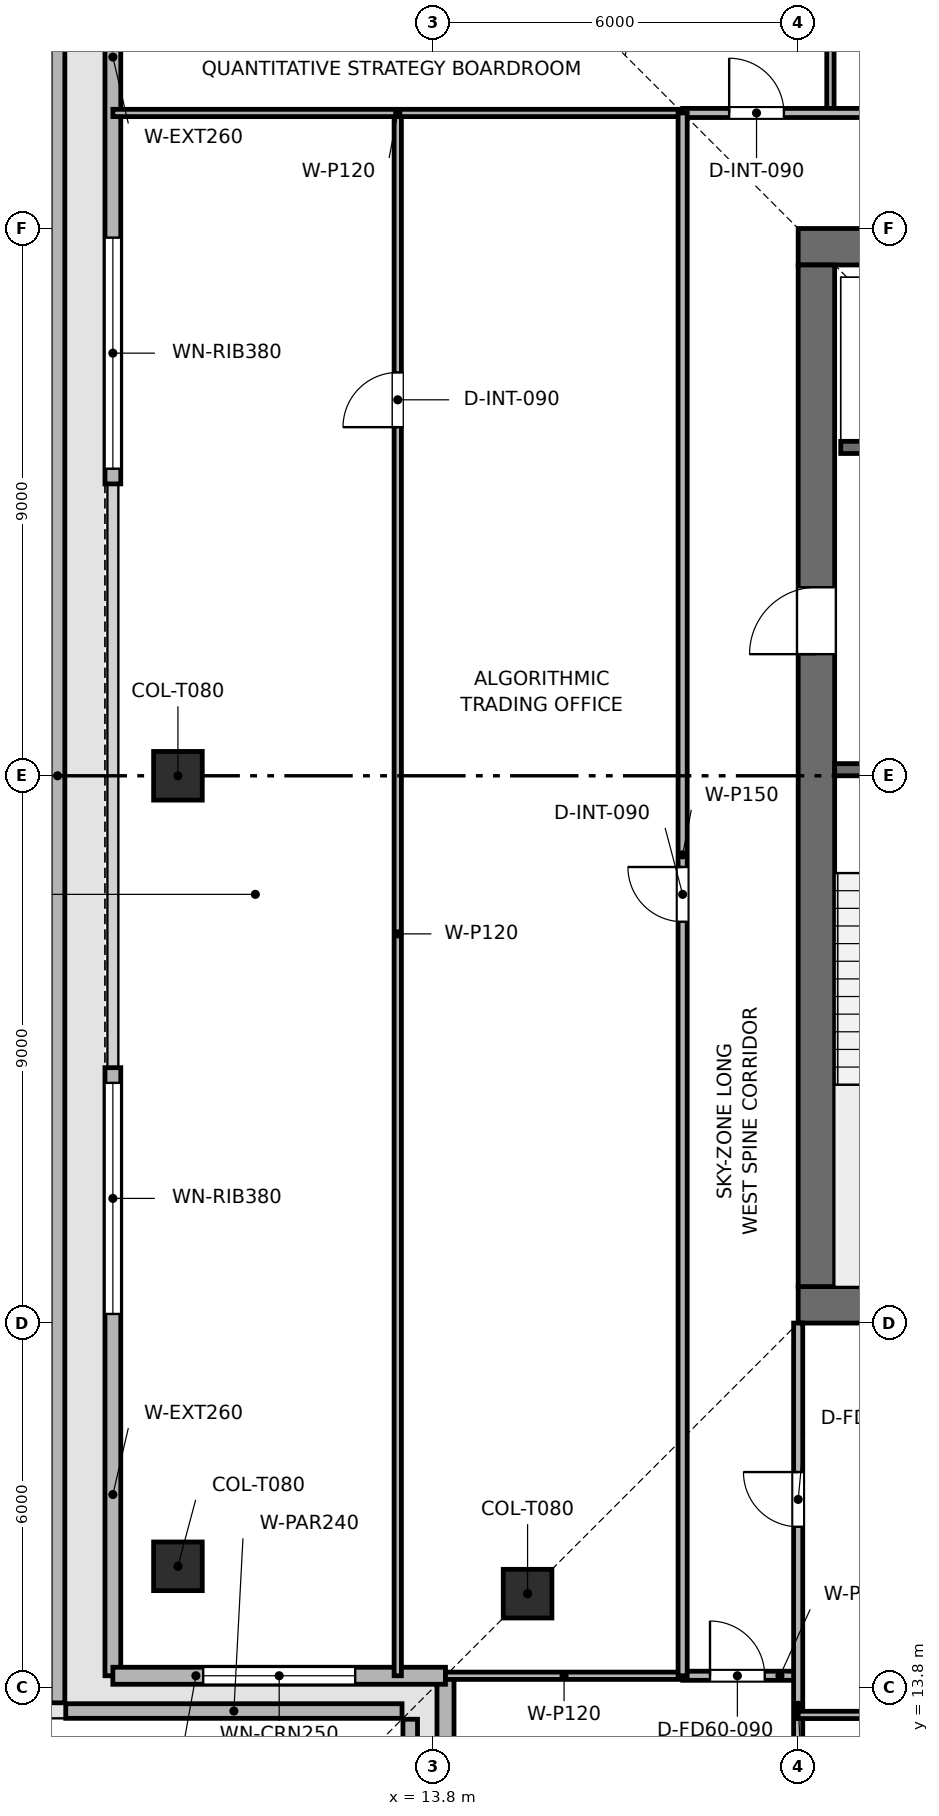
"""IFC4 building model, lengths in metres.
Left out: names, types, materials, properties, quantities, classifications, styles, units other than length and angle.
Written with IfcOpenShell. Run it as: python <this file> out.ifc"""

import sys

from ifc_helpers import new_model, si_unit, direction, frame, frame_2d, origin, origin_2d, place, context, subcontext, project, spatial, rectangle, extrude, element, fill, save


model = new_model("IFC4")
c1 = context("Model", 3, precision=1e-05, world=origin(), true_north=direction((0.0, 1.0)))
c2 = subcontext(c1, "Body", "Model", "MODEL_VIEW")
j1 = project(units=[si_unit("LENGTHUNIT", "METRE"), si_unit("PLANEANGLEUNIT", "RADIAN")], contexts=[c1])
p1 = place(None, origin())
s1 = spatial("IfcSite", under=j1, at=p1, CompositionType="ELEMENT")
p2 = place(p1, origin())
s2 = spatial("IfcBuilding", under=s1, at=p2, CompositionType="ELEMENT")
p3 = place(p2, frame((0.0, 0.0, 355.5)))
s3 = spatial("IfcBuildingStorey", under=s2, at=p3, CompositionType="ELEMENT", Elevation=355.5)
p4 = place(p3, frame((19.8, 20.1, 0.0), z_axis=(0.0, 0.0, 1.0), x_axis=(1.0, 0.0, 0.0)))
e1 = element("IfcWall", 1, at=p4, inside=s3, PredefinedType="SHEAR", context=c2, shape_type="SweptSolid", body=[
    extrude(rectangle(XDim=18.0, YDim=0.6, at=frame_2d((9.0, 0.0))), origin(), (0.0, 0.0, 1.0), 4.5),
])
p5 = place(p3, frame((19.8, 37.5, 0.0), z_axis=(0.0, 0.0, 1.0), x_axis=(1.0, 0.0, 0.0)))
e2 = element("IfcWall", 2, at=p5, inside=s3, PredefinedType="SHEAR", context=c2, shape_type="SweptSolid", body=[
    extrude(rectangle(XDim=18.0, YDim=0.6, at=frame_2d((9.0, 0.0))), origin(), (0.0, 0.0, 1.0), 4.5),
])
p6 = place(p5, frame((7.05, 0.0, 0.0)))
e3 = element("IfcOpeningElement", 3, at=p6, cuts=e2, PredefinedType="OPENING", context=c2, shape_type="SweptSolid", body=[
    extrude(rectangle(XDim=1.1, YDim=2.15, at=frame_2d((0.55, 1.075))), frame((0.0, 0.31, 0.0), z_axis=(0.0, -1.0, 0.0), x_axis=(1.0, 0.0, 0.0)), (0.0, 0.0, 1.0), 0.62),
])
p7 = place(p3, frame((20.1, 20.4, 0.0), z_axis=(0.0, 0.0, 1.0), x_axis=(0.0, 1.0, 0.0)))
e4 = element("IfcWall", 4, at=p7, inside=s3, PredefinedType="SHEAR", context=c2, shape_type="SweptSolid", body=[
    extrude(rectangle(XDim=16.8, YDim=0.6, at=frame_2d((8.4, 0.0))), origin(), (0.0, 0.0, 1.0), 4.5),
])
p8 = place(p7, frame((10.4, 0.0, 0.0)))
e5 = element("IfcOpeningElement", 5, at=p8, cuts=e4, PredefinedType="OPENING", context=c2, shape_type="SweptSolid", body=[
    extrude(rectangle(XDim=1.1, YDim=2.15, at=frame_2d((0.55, 1.075))), frame((0.0, 0.31, 0.0), z_axis=(0.0, -1.0, 0.0), x_axis=(1.0, 0.0, 0.0)), (0.0, 0.0, 1.0), 0.62),
])
for number, where, z_axis, x_axis in (
    (6, (9.6, 28.8, 0.003), (0.0, 0.0, 1.0), (1.0, 0.0, 0.0)),
    (7, (9.6, 15.8, 0.003), (0.0, 0.0, 1.0), (1.0, 0.0, 0.0)),
    (8, (15.35, 15.35, 0.003), (0.0, 0.0, 1.0), (1.0, 0.0, 0.0)),
):
    element("IfcColumn", number, at=place(p3, frame(where, z_axis=z_axis, x_axis=x_axis)), inside=s3, PredefinedType="COLUMN", context=c2, shape_type="SweptSolid", body=[
        extrude(rectangle(XDim=0.8, YDim=0.8, at=origin_2d()), origin(), (0.0, 0.0, 1.0), 4.234),
    ])
p9 = place(p3, frame((7.62, 44.045, 0.0), z_axis=(0.0, 0.0, 1.0), x_axis=(0.0, -1.0, 0.0)))
e9 = element("IfcWall", 9, at=p9, inside=s3, PredefinedType="PARAPET", context=c2, shape_type="SweptSolid", body=[
    extrude(rectangle(XDim=30.49, YDim=0.24, at=frame_2d((15.245, 0.0))), origin(), (0.0, 0.0, 1.0), 1.2),
])
for number, where, z_axis, x_axis in (
    (10, (7.755, 13.42, 0.0), (0.0, 0.0, 1.0), (1.0, 0.0, 0.0)),
    (11, (13.42, 13.285, 0.0), (0.0, 0.0, 1.0), (0.0, -1.0, 0.0)),
):
    element("IfcWall", number, at=place(p3, frame(where, z_axis=z_axis, x_axis=x_axis)), inside=s3, PredefinedType="PARAPET", context=c2, shape_type="SweptSolid", body=[
        extrude(rectangle(XDim=5.53, YDim=0.24, at=frame_2d((2.765, 0.0))), origin(), (0.0, 0.0, 1.0), 1.2),
    ])
p10 = place(p3, frame((8.53, 14.0, 0.0), z_axis=(0.0, 0.0, 1.0), x_axis=(0.0, 1.0, 0.0)))
e12 = element("IfcWall", 12, at=p10, inside=s3, PredefinedType="SOLIDWALL", context=c2, shape_type="SweptSolid", body=[
    extrude(rectangle(XDim=10.0, YDim=0.26, at=frame_2d((5.0, 0.0))), origin(), (0.0, 0.0, 1.0), 4.24),
])
p11 = place(p10, frame((5.95, 0.0, 0.9)))
e13 = element("IfcOpeningElement", 13, at=p11, cuts=e12, PredefinedType="OPENING", context=c2, shape_type="SweptSolid", body=[
    extrude(rectangle(XDim=3.8, YDim=1.9, at=frame_2d((1.9, 0.95))), frame((0.0, 0.14, 0.0), z_axis=(0.0, -1.0, 0.0), x_axis=(1.0, 0.0, 0.0)), (0.0, 0.0, 1.0), 0.28),
])
p12 = place(p3, frame((8.53, 33.6, 0.0), z_axis=(0.0, 0.0, 1.0), x_axis=(0.0, 1.0, 0.0)))
e14 = element("IfcWall", 14, at=p12, inside=s3, PredefinedType="SOLIDWALL", context=c2, shape_type="SweptSolid", body=[
    extrude(rectangle(XDim=10.0, YDim=0.26, at=frame_2d((5.0, 0.0))), origin(), (0.0, 0.0, 1.0), 4.24),
])
p13 = place(p12, frame((0.25, 0.0, 0.9)))
e15 = element("IfcOpeningElement", 15, at=p13, cuts=e14, PredefinedType="OPENING", context=c2, shape_type="SweptSolid", body=[
    extrude(rectangle(XDim=3.8, YDim=1.9, at=frame_2d((1.9, 0.95))), frame((0.0, 0.14, 0.0), z_axis=(0.0, -1.0, 0.0), x_axis=(1.0, 0.0, 0.0)), (0.0, 0.0, 1.0), 0.28),
])
p14 = place(p3, frame((14.0, 8.53, 0.0), z_axis=(0.0, 0.0, 1.0), x_axis=(0.0, 1.0, 0.0)))
e16 = element("IfcWall", 16, at=p14, inside=s3, PredefinedType="SOLIDWALL", context=c2, shape_type="SweptSolid", body=[
    extrude(rectangle(XDim=5.47, YDim=0.28, at=frame_2d((2.735, 0.0))), origin(), (0.0, 0.0, 1.0), 4.24),
])
p15 = place(p14, frame((1.485, 0.0, 0.9)))
e17 = element("IfcOpeningElement", 17, at=p15, cuts=e16, PredefinedType="OPENING", context=c2, shape_type="SweptSolid", body=[
    extrude(rectangle(XDim=2.5, YDim=1.9, at=frame_2d((1.25, 0.95))), frame((0.0, 0.15, 0.0), z_axis=(0.0, -1.0, 0.0), x_axis=(1.0, 0.0, 0.0)), (0.0, 0.0, 1.0), 0.3),
])
p16 = place(p3, frame((14.0, 14.0, 0.0), z_axis=(0.0, 0.0, 1.0), x_axis=(-1.0, 0.0, 0.0)))
e18 = element("IfcWall", 18, at=p16, inside=s3, PredefinedType="SOLIDWALL", context=c2, shape_type="SweptSolid", body=[
    extrude(rectangle(XDim=5.47, YDim=0.28, at=frame_2d((2.735, 0.0))), origin(), (0.0, 0.0, 1.0), 4.24),
])
p17 = place(p16, frame((1.485, 0.0, 0.9)))
e19 = element("IfcOpeningElement", 19, at=p17, cuts=e18, PredefinedType="OPENING", context=c2, shape_type="SweptSolid", body=[
    extrude(rectangle(XDim=2.5, YDim=1.9, at=frame_2d((1.25, 0.95))), frame((0.0, 0.15, 0.0), z_axis=(0.0, -1.0, 0.0), x_axis=(1.0, 0.0, 0.0)), (0.0, 0.0, 1.0), 0.3),
])
p18 = place(p3, frame((20.4, 28.9, 0.0), z_axis=(0.0, 0.0, 1.0), x_axis=(1.0, 0.0, 0.0)))
e20 = element("IfcWall", 20, at=p18, inside=s3, PredefinedType="SHEAR", context=c2, shape_type="SweptSolid", body=[
    extrude(rectangle(XDim=3.15, YDim=0.2, at=frame_2d((1.575, 0.0))), origin(), (0.0, 0.0, 1.0), 4.24),
])
p19 = place(p18, frame((0.8, 0.0, 0.0)))
e21 = element("IfcOpeningElement", 21, at=p19, cuts=e20, PredefinedType="OPENING", context=c2, shape_type="SweptSolid", body=[
    extrude(rectangle(XDim=1.0, YDim=2.1, at=frame_2d((0.5, 1.05))), frame((0.0, 0.11, 0.0), z_axis=(0.0, -1.0, 0.0), x_axis=(1.0, 0.0, 0.0)), (0.0, 0.0, 1.0), 0.22),
])
p20 = place(p3, frame((20.5, 34.2, 0.0), z_axis=(0.0, 0.0, 1.0), x_axis=(1.0, 0.0, 0.0)))
e22 = element("IfcWall", 22, at=p20, inside=s3, PredefinedType="SHEAR", context=c2, shape_type="SweptSolid", body=[
    extrude(rectangle(XDim=3.05, YDim=0.2, at=frame_2d((1.525, 0.0))), origin(), (0.0, 0.0, 1.0), 4.24),
])
p21 = place(p20, frame((0.75, 0.0, 0.0)))
e23 = element("IfcOpeningElement", 23, at=p21, cuts=e22, PredefinedType="OPENING", context=c2, shape_type="SweptSolid", body=[
    extrude(rectangle(XDim=1.1, YDim=2.15, at=frame_2d((0.55, 1.075))), frame((0.0, 0.11, 0.0), z_axis=(0.0, -1.0, 0.0), x_axis=(1.0, 0.0, 0.0)), (0.0, 0.0, 1.0), 0.22),
])
p22 = place(p3, frame((20.33, 39.7, 0.0), z_axis=(0.0, 0.0, 1.0), x_axis=(0.0, 1.0, 0.0)))
e24 = element("IfcWall", 24, at=p22, inside=s3, PredefinedType="PARTITIONING", context=c2, shape_type="SweptSolid", body=[
    extrude(rectangle(XDim=9.37, YDim=0.12, at=frame_2d((4.685, 0.0))), origin(), (0.0, 0.0, 1.0), 3.825),
])
p23 = place(p3, frame((13.215, 14.0, 0.0), z_axis=(0.0, 0.0, 1.0), x_axis=(0.0, 1.0, 0.0)))
e25 = element("IfcWall", 25, at=p23, inside=s3, PredefinedType="PARTITIONING", context=c2, shape_type="SweptSolid", body=[
    extrude(rectangle(XDim=25.7, YDim=0.12, at=frame_2d((12.85, 0.0))), origin(), (0.0, 0.0, 1.0), 3.825),
])
p24 = place(p23, frame((20.533, 0.0, 0.0)))
e26 = element("IfcOpeningElement", 26, at=p24, cuts=e25, PredefinedType="OPENING", context=c2, shape_type="SweptSolid", body=[
    extrude(rectangle(XDim=0.9, YDim=2.1, at=frame_2d((0.45, 1.05))), frame((0.0, 0.07, 0.0), z_axis=(0.0, -1.0, 0.0), x_axis=(1.0, 0.0, 0.0)), (0.0, 0.0, 1.0), 0.14),
])
p25 = place(p3, frame((14.0, 14.0, 0.0), z_axis=(0.0, 0.0, 1.0), x_axis=(1.0, 0.0, 0.0)))
e27 = element("IfcWall", 27, at=p25, inside=s3, PredefinedType="PARTITIONING", context=c2, shape_type="SweptSolid", body=[
    extrude(rectangle(XDim=3.9, YDim=0.12, at=frame_2d((1.95, 0.0))), origin(), (0.0, 0.0, 1.0), 3.925),
])
p26 = place(p3, frame((17.9, 14.0, 0.0), z_axis=(0.0, 0.0, 1.0), x_axis=(1.0, 0.0, 0.0)))
e28 = element("IfcWall", 28, at=p26, inside=s3, PredefinedType="PARTITIONING", context=c2, shape_type="SweptSolid", body=[
    extrude(rectangle(XDim=1.9, YDim=0.15, at=frame_2d((0.95, 0.0))), origin(), (0.0, 0.0, 1.0), 4.24),
])
p27 = place(p26, frame((0.45, 0.0, 0.0)))
e29 = element("IfcOpeningElement", 29, at=p27, cuts=e28, PredefinedType="OPENING", context=c2, shape_type="SweptSolid", body=[
    extrude(rectangle(XDim=0.9, YDim=2.1, at=frame_2d((0.45, 1.05))), frame((0.0, 0.085, 0.0), z_axis=(0.0, -1.0, 0.0), x_axis=(1.0, 0.0, 0.0)), (0.0, 0.0, 1.0), 0.17),
])
p28 = place(p3, frame((19.8, 8.53, 0.0), z_axis=(0.0, 0.0, 1.0), x_axis=(0.0, 1.0, 0.0)))
e30 = element("IfcWall", 30, at=p28, inside=s3, PredefinedType="PARTITIONING", context=c2, shape_type="SweptSolid", body=[
    extrude(rectangle(XDim=11.27, YDim=0.15, at=frame_2d((5.635, 0.0))), origin(), (0.0, 0.0, 1.0), 3.825),
])
p29 = place(p28, frame((7.92, 0.0, 0.0)))
e31 = element("IfcOpeningElement", 31, at=p29, cuts=e30, PredefinedType="OPENING", context=c2, shape_type="SweptSolid", body=[
    extrude(rectangle(XDim=0.9, YDim=2.1, at=frame_2d((0.45, 1.05))), frame((0.0, 0.085, 0.0), z_axis=(0.0, -1.0, 0.0), x_axis=(1.0, 0.0, 0.0)), (0.0, 0.0, 1.0), 0.17),
])
p30 = place(p3, frame((19.8, 13.356, 0.0), z_axis=(0.0, 0.0, 1.0), x_axis=(1.0, 0.0, 0.0)))
e32 = element("IfcWall", 32, at=p30, inside=s3, PredefinedType="PARTITIONING", context=c2, shape_type="SweptSolid", body=[
    extrude(rectangle(XDim=6.908, YDim=0.12, at=frame_2d((3.454, 0.0))), origin(), (0.0, 0.0, 1.0), 3.825),
])
p31 = place(p30, frame((2.303, 0.0, 0.0)))
e33 = element("IfcOpeningElement", 33, at=p31, cuts=e32, PredefinedType="OPENING", context=c2, shape_type="SweptSolid", body=[
    extrude(rectangle(XDim=0.9, YDim=2.1, at=frame_2d((0.45, 1.05))), frame((0.0, 0.07, 0.0), z_axis=(0.0, -1.0, 0.0), x_axis=(1.0, 0.0, 0.0)), (0.0, 0.0, 1.0), 0.14),
])
p32 = place(p3, frame((8.53, 39.7, 0.0), z_axis=(0.0, 0.0, 1.0), x_axis=(1.0, 0.0, 0.0)))
e34 = element("IfcWall", 34, at=p32, inside=s3, PredefinedType="PARTITIONING", context=c2, shape_type="SweptSolid", body=[
    extrude(rectangle(XDim=9.37, YDim=0.12, at=frame_2d((4.685, 0.0))), origin(), (0.0, 0.0, 1.0), 3.825),
])
p33 = place(p3, frame((17.9, 39.7, 0.0), z_axis=(0.0, 0.0, 1.0), x_axis=(1.0, 0.0, 0.0)))
e35 = element("IfcWall", 35, at=p33, inside=s3, PredefinedType="PARTITIONING", context=c2, shape_type="SweptSolid", body=[
    extrude(rectangle(XDim=21.8, YDim=0.15, at=frame_2d((10.9, 0.0))), origin(), (0.0, 0.0, 1.0), 3.825),
])
p34 = place(p33, frame((0.765, 0.0, 0.0)))
e36 = element("IfcOpeningElement", 36, at=p34, cuts=e35, PredefinedType="OPENING", context=c2, shape_type="SweptSolid", body=[
    extrude(rectangle(XDim=0.9, YDim=2.1, at=frame_2d((0.45, 1.05))), frame((0.0, 0.085, 0.0), z_axis=(0.0, -1.0, 0.0), x_axis=(1.0, 0.0, 0.0)), (0.0, 0.0, 1.0), 0.17),
])
p35 = place(p33, frame((6.195, 0.0, 0.0)))
e37 = element("IfcOpeningElement", 37, at=p35, cuts=e35, PredefinedType="OPENING", context=c2, shape_type="SweptSolid", body=[
    extrude(rectangle(XDim=0.9, YDim=2.1, at=frame_2d((0.45, 1.05))), frame((0.0, 0.085, 0.0), z_axis=(0.0, -1.0, 0.0), x_axis=(1.0, 0.0, 0.0)), (0.0, 0.0, 1.0), 0.17),
])
p36 = place(p33, frame((15.88, 0.0, 0.0)))
e38 = element("IfcOpeningElement", 38, at=p36, cuts=e35, PredefinedType="OPENING", context=c2, shape_type="SweptSolid", body=[
    extrude(rectangle(XDim=0.9, YDim=2.1, at=frame_2d((0.45, 1.05))), frame((0.0, 0.085, 0.0), z_axis=(0.0, -1.0, 0.0), x_axis=(1.0, 0.0, 0.0)), (0.0, 0.0, 1.0), 0.17),
])
p37 = place(p3, frame((17.9, 14.0, 0.0), z_axis=(0.0, 0.0, 1.0), x_axis=(0.0, 1.0, 0.0)))
e39 = element("IfcWall", 39, at=p37, inside=s3, PredefinedType="PARTITIONING", context=c2, shape_type="SweptSolid", body=[
    extrude(rectangle(XDim=25.7, YDim=0.15, at=frame_2d((12.85, 0.0))), origin(), (0.0, 0.0, 1.0), 3.825),
])
p38 = place(p37, frame((12.4, 0.0, 0.0)))
e40 = element("IfcOpeningElement", 40, at=p38, cuts=e39, PredefinedType="OPENING", context=c2, shape_type="SweptSolid", body=[
    extrude(rectangle(XDim=0.9, YDim=2.1, at=frame_2d((0.45, 1.05))), frame((0.0, 0.085, 0.0), z_axis=(0.0, -1.0, 0.0), x_axis=(1.0, 0.0, 0.0)), (0.0, 0.0, 1.0), 0.17),
])
p39 = place(p11, origin())
e41 = element("IfcWindow", 41, at=p39, inside=s3, PartitioningType="SINGLE_PANEL", PredefinedType="WINDOW", context=c2, shape_type="SweptSolid", body=[
    extrude(rectangle(XDim=3.8, YDim=1.9, at=frame_2d((1.9, 0.95))), frame((0.0, 0.03, 0.0), z_axis=(0.0, -1.0, 0.0), x_axis=(1.0, 0.0, 0.0)), (0.0, 0.0, 1.0), 0.06),
])
fill(e13, e41)
p40 = place(p13, origin())
e42 = element("IfcWindow", 42, at=p40, inside=s3, PartitioningType="SINGLE_PANEL", PredefinedType="WINDOW", context=c2, shape_type="SweptSolid", body=[
    extrude(rectangle(XDim=3.8, YDim=1.9, at=frame_2d((1.9, 0.95))), frame((0.0, 0.03, 0.0), z_axis=(0.0, -1.0, 0.0), x_axis=(1.0, 0.0, 0.0)), (0.0, 0.0, 1.0), 0.06),
])
fill(e15, e42)
p41 = place(p17, origin())
e43 = element("IfcWindow", 43, at=p41, inside=s3, PartitioningType="SINGLE_PANEL", PredefinedType="WINDOW", context=c2, shape_type="SweptSolid", body=[
    extrude(rectangle(XDim=2.5, YDim=1.9, at=frame_2d((1.25, 0.95))), frame((0.0, 0.03, 0.0), z_axis=(0.0, -1.0, 0.0), x_axis=(1.0, 0.0, 0.0)), (0.0, 0.0, 1.0), 0.06),
])
fill(e19, e43)
p42 = place(p24, origin())
e44 = element("IfcDoor", 44, at=p42, inside=s3, OperationType="SINGLE_SWING_LEFT", PredefinedType="DOOR", context=c2, shape_type="SweptSolid", body=[
    extrude(rectangle(XDim=0.9, YDim=2.1, at=frame_2d((0.45, 1.05))), frame((0.0, 0.025, 0.0), z_axis=(0.0, -1.0, 0.0), x_axis=(1.0, 0.0, 0.0)), (0.0, 0.0, 1.0), 0.05),
])
fill(e26, e44)
p43 = place(p27, origin())
e45 = element("IfcDoor", 45, at=p43, inside=s3, OperationType="SINGLE_SWING_LEFT", PredefinedType="DOOR", context=c2, shape_type="SweptSolid", body=[
    extrude(rectangle(XDim=0.9, YDim=2.1, at=frame_2d((0.45, 1.05))), frame((0.0, 0.025, 0.0), z_axis=(0.0, -1.0, 0.0), x_axis=(1.0, 0.0, 0.0)), (0.0, 0.0, 1.0), 0.05),
])
fill(e29, e45)
p44 = place(p29, origin())
e46 = element("IfcDoor", 46, at=p44, inside=s3, OperationType="SINGLE_SWING_RIGHT", PredefinedType="DOOR", context=c2, shape_type="SweptSolid", body=[
    extrude(rectangle(XDim=0.9, YDim=2.1, at=frame_2d((0.45, 1.05))), frame((0.0, 0.025, 0.0), z_axis=(0.0, -1.0, 0.0), x_axis=(1.0, 0.0, 0.0)), (0.0, 0.0, 1.0), 0.05),
])
fill(e31, e46)
p45 = place(p34, origin())
e47 = element("IfcDoor", 47, at=p45, inside=s3, OperationType="SINGLE_SWING_LEFT", PredefinedType="DOOR", context=c2, shape_type="SweptSolid", body=[
    extrude(rectangle(XDim=0.9, YDim=2.1, at=frame_2d((0.45, 1.05))), frame((0.0, 0.025, 0.0), z_axis=(0.0, -1.0, 0.0), x_axis=(1.0, 0.0, 0.0)), (0.0, 0.0, 1.0), 0.05),
])
fill(e36, e47)
p46 = place(p38, origin())
e48 = element("IfcDoor", 48, at=p46, inside=s3, OperationType="SINGLE_SWING_RIGHT", PredefinedType="DOOR", context=c2, shape_type="SweptSolid", body=[
    extrude(rectangle(XDim=0.9, YDim=2.1, at=frame_2d((0.45, 1.05))), frame((0.0, 0.025, 0.0), z_axis=(0.0, -1.0, 0.0), x_axis=(1.0, 0.0, 0.0)), (0.0, 0.0, 1.0), 0.05),
])
fill(e40, e48)
p47 = place(p8, origin())
e49 = element("IfcDoor", 49, at=p47, inside=s3, OperationType="SINGLE_SWING_LEFT", PredefinedType="DOOR", context=c2, shape_type="SweptSolid", body=[
    extrude(rectangle(XDim=1.1, YDim=2.15, at=frame_2d((0.55, 1.075))), frame((0.0, 0.025, 0.0), z_axis=(0.0, -1.0, 0.0), x_axis=(1.0, 0.0, 0.0)), (0.0, 0.0, 1.0), 0.05),
])
fill(e5, e49)
save(model, sys.argv[1])
